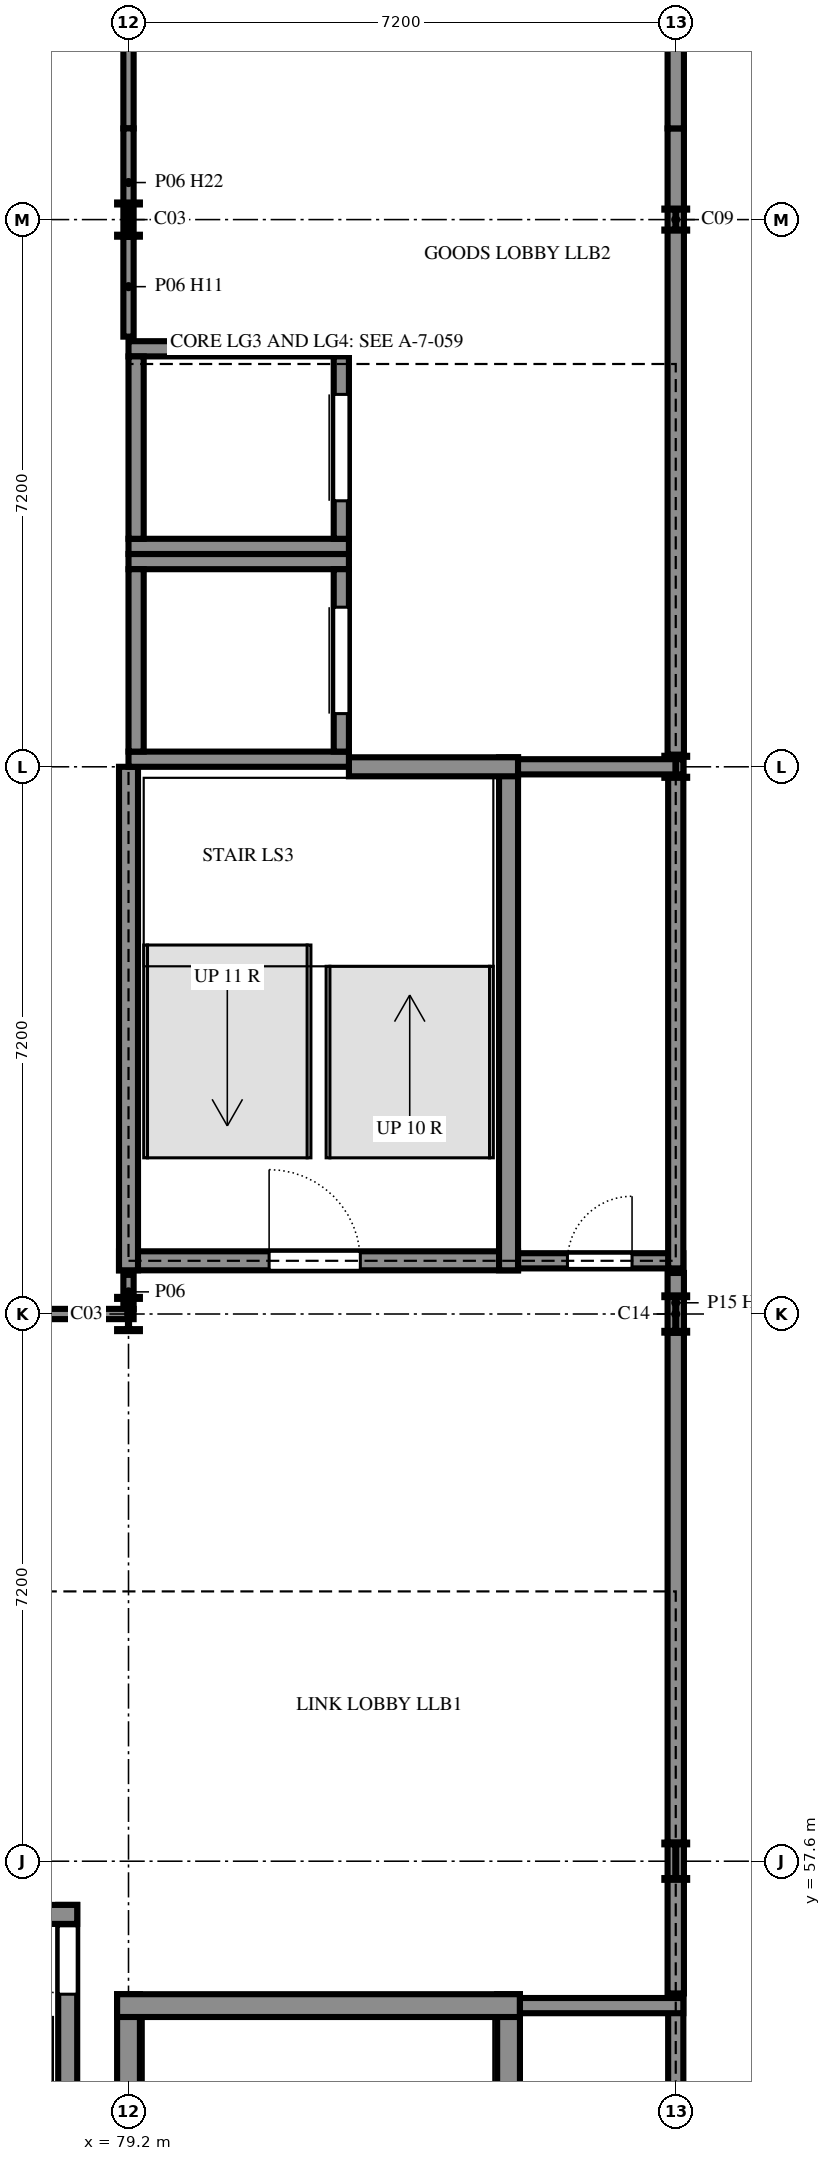
"""IFC4 building model, lengths in metres.
Left out: names, types, materials, properties, quantities, classifications, styles, units other than length and angle.
Written with IfcOpenShell. Run it as: python <this file> out.ifc"""

import sys

from ifc_helpers import new_model, si_unit, direction, frame, frame_2d, origin, origin_2d, place, context, subcontext, project, spatial, rectangle, i_section, extrude, element, fill, save


model = new_model("IFC4")
c1 = context("Model", 3, precision=1e-05, world=origin(), true_north=direction((0.0, 1.0)))
c2 = subcontext(c1, "Body", "Model", "MODEL_VIEW")
j1 = project(units=[si_unit("LENGTHUNIT", "METRE"), si_unit("PLANEANGLEUNIT", "RADIAN")], contexts=[c1])
p1 = place(None, origin())
s1 = spatial("IfcSite", under=j1, at=p1, CompositionType="ELEMENT")
p2 = place(p1, origin())
s2 = spatial("IfcBuilding", under=s1, at=p2, CompositionType="ELEMENT")
p3 = place(p2, frame((0.0, 0.0, 3.6)))
s3 = spatial("IfcBuildingStorey", under=s2, at=p3, CompositionType="ELEMENT", Elevation=3.6)
for number, where, z_axis, x_axis in (
    (1, (79.2, 64.8, 0.0), (0.0, 0.0, 1.0), (1.0, 0.0, 0.0)),
    (2, (79.2, 79.2, 0.0), (0.0, 0.0, 1.0), (1.0, 0.0, 0.0)),
):
    element("IfcColumn", number, at=place(p3, frame(where, z_axis=z_axis, x_axis=x_axis)), inside=s3, PredefinedType="COLUMN", context=c2, shape_type="SweptSolid", body=[
        extrude(i_section(OverallWidth=0.3, OverallDepth=0.45, WebThickness=0.014, FlangeThickness=0.026, FilletRadius=0.027, at=origin_2d()), origin(), (0.0, 0.0, 1.0), 3.6),
    ])
for number, where, z_axis, x_axis in (
    (3, (86.4, 57.6, 0.0), (0.0, 0.0, 1.0), (1.0, 0.0, 0.0)),
    (4, (86.4, 64.8, 0.0), (0.0, 0.0, 1.0), (1.0, 0.0, 0.0)),
):
    element("IfcColumn", number, at=place(p3, frame(where, z_axis=z_axis, x_axis=x_axis)), inside=s3, PredefinedType="COLUMN", context=c2, shape_type="SweptSolid", body=[
        extrude(i_section(OverallWidth=0.3, OverallDepth=0.49, WebThickness=0.012, FlangeThickness=0.023, FilletRadius=0.027, at=origin_2d()), origin(), (0.0, 0.0, 1.0), 3.6),
    ])
for number, where, z_axis, x_axis in (
    (5, (86.4, 72.0, 0.0), (0.0, 0.0, 1.0), (1.0, 0.0, 0.0)),
    (6, (86.4, 79.2, 0.0), (0.0, 0.0, 1.0), (1.0, 0.0, 0.0)),
):
    element("IfcColumn", number, at=place(p3, frame(where, z_axis=z_axis, x_axis=x_axis)), inside=s3, PredefinedType="COLUMN", context=c2, shape_type="SweptSolid", body=[
        extrude(i_section(OverallWidth=0.3, OverallDepth=0.29, WebThickness=0.009, FlangeThickness=0.014, FilletRadius=0.027, at=origin_2d()), origin(), (0.0, 0.0, 1.0), 3.6),
    ])
p4 = place(p3, frame((84.2, 49.05, 0.0), z_axis=(0.0, 0.0, 1.0), x_axis=(0.0, 1.0, 0.0)))
e7 = element("IfcWall", 7, at=p4, inside=s3, PredefinedType="SHEAR", context=c2, shape_type="SweptSolid", body=[
    extrude(rectangle(XDim=6.8, YDim=0.3, at=frame_2d((3.4, 0.0))), origin(), (0.0, 0.0, 1.0), 3.6),
])
p5 = place(p3, frame((86.4, 49.1, 0.0), z_axis=(0.0, 0.0, 1.0), x_axis=(0.0, 1.0, 0.0)))
e8 = element("IfcWall", 8, at=p5, inside=s3, PredefinedType="SHEAR", context=c2, shape_type="SweptSolid", body=[
    extrude(rectangle(XDim=6.7, YDim=0.2, at=frame_2d((3.35, 0.0))), origin(), (0.0, 0.0, 1.0), 3.6),
])
p6 = place(p3, frame((78.4, 50.275, 0.0), z_axis=(0.0, 0.0, 1.0), x_axis=(0.0, 1.0, 0.0)))
e9 = element("IfcWall", 9, at=p6, inside=s3, PredefinedType="SHEAR", context=c2, shape_type="SweptSolid", body=[
    extrude(rectangle(XDim=6.75, YDim=0.25, at=frame_2d((3.375, 0.0))), origin(), (0.0, 0.0, 1.0), 3.6),
])
p7 = place(p6, frame((5.575, 0.0, 0.0)))
e10 = element("IfcOpeningElement", 10, at=p7, cuts=e9, PredefinedType="OPENING", context=c2, shape_type="SweptSolid", body=[
    extrude(rectangle(XDim=0.9, YDim=2.1, at=frame_2d((0.45, 1.05))), frame((0.0, 0.135, 0.0), z_axis=(0.0, -1.0, 0.0), x_axis=(1.0, 0.0, 0.0)), (0.0, 0.0, 1.0), 0.27),
])
p8 = place(p3, frame((79.2, 55.85, 0.0), z_axis=(0.0, 0.0, 1.0), x_axis=(0.0, -1.0, 0.0)))
e11 = element("IfcWall", 11, at=p8, inside=s3, PredefinedType="SHEAR", context=c2, shape_type="SweptSolid", body=[
    extrude(rectangle(XDim=5.325, YDim=0.3, at=frame_2d((2.663, 0.0))), origin(), (0.0, 0.0, 1.0), 3.6),
])
p9 = place(p3, frame((84.35, 55.7, 0.0), z_axis=(0.0, 0.0, 1.0), x_axis=(-1.0, 0.0, 0.0)))
e12 = element("IfcWall", 12, at=p9, inside=s3, PredefinedType="SHEAR", context=c2, shape_type="SweptSolid", body=[
    extrude(rectangle(XDim=5.3, YDim=0.3, at=frame_2d((2.65, 0.0))), origin(), (0.0, 0.0, 1.0), 3.6),
])
p10 = place(p3, frame((86.5, 55.7, 0.0), z_axis=(0.0, 0.0, 1.0), x_axis=(-1.0, 0.0, 0.0)))
e13 = element("IfcWall", 13, at=p10, inside=s3, PredefinedType="SHEAR", context=c2, shape_type="SweptSolid", body=[
    extrude(rectangle(XDim=2.15, YDim=0.2, at=frame_2d((1.075, 0.0))), origin(), (0.0, 0.0, 1.0), 3.6),
])
p11 = place(p3, frame((78.525, 56.9, 0.0), z_axis=(0.0, 0.0, 1.0), x_axis=(-1.0, 0.0, 0.0)))
e14 = element("IfcWall", 14, at=p11, inside=s3, PredefinedType="SHEAR", context=c2, shape_type="SweptSolid", body=[
    extrude(rectangle(XDim=5.0, YDim=0.25, at=frame_2d((2.5, 0.0))), origin(), (0.0, 0.0, 1.0), 3.6),
])
p12 = place(p3, frame((79.075, 65.5, 0.0), z_axis=(0.0, 0.0, 1.0), x_axis=(1.0, 0.0, 0.0)))
e15 = element("IfcWall", 15, at=p12, inside=s3, PredefinedType="SHEAR", context=c2, shape_type="SweptSolid", body=[
    extrude(rectangle(XDim=5.25, YDim=0.25, at=frame_2d((2.625, 0.0))), origin(), (0.0, 0.0, 1.0), 3.6),
])
p13 = place(p12, frame((1.975, 0.0, 0.0)))
e16 = element("IfcOpeningElement", 16, at=p13, cuts=e15, PredefinedType="OPENING", context=c2, shape_type="SweptSolid", body=[
    extrude(rectangle(XDim=1.2, YDim=2.4, at=frame_2d((0.6, 1.2))), frame((0.0, 0.135, 0.0), z_axis=(0.0, -1.0, 0.0), x_axis=(1.0, 0.0, 0.0)), (0.0, 0.0, 1.0), 0.27),
])
p14 = place(p3, frame((84.325, 65.5, 0.0), z_axis=(0.0, 0.0, 1.0), x_axis=(1.0, 0.0, 0.0)))
e17 = element("IfcWall", 17, at=p14, inside=s3, PredefinedType="SHEAR", context=c2, shape_type="SweptSolid", body=[
    extrude(rectangle(XDim=2.175, YDim=0.2, at=frame_2d((1.087, 0.0))), origin(), (0.0, 0.0, 1.0), 3.6),
])
p15 = place(p14, frame((0.65, 0.0, 0.0)))
e18 = element("IfcOpeningElement", 18, at=p15, cuts=e17, PredefinedType="OPENING", context=c2, shape_type="SweptSolid", body=[
    extrude(rectangle(XDim=0.85, YDim=2.1, at=frame_2d((0.425, 1.05))), frame((0.0, 0.11, 0.0), z_axis=(0.0, -1.0, 0.0), x_axis=(1.0, 0.0, 0.0)), (0.0, 0.0, 1.0), 0.22),
])
p16 = place(p3, frame((84.2, 65.375, 0.0), z_axis=(0.0, 0.0, 1.0), x_axis=(0.0, 1.0, 0.0)))
e19 = element("IfcWall", 19, at=p16, inside=s3, PredefinedType="SHEAR", context=c2, shape_type="SweptSolid", body=[
    extrude(rectangle(XDim=6.75, YDim=0.25, at=frame_2d((3.375, 0.0))), origin(), (0.0, 0.0, 1.0), 3.6),
])
p17 = place(p3, frame((86.4, 65.4, 0.0), z_axis=(0.0, 0.0, 1.0), x_axis=(0.0, 1.0, 0.0)))
e20 = element("IfcWall", 20, at=p17, inside=s3, PredefinedType="SHEAR", context=c2, shape_type="SweptSolid", body=[
    extrude(rectangle(XDim=6.7, YDim=0.2, at=frame_2d((3.35, 0.0))), origin(), (0.0, 0.0, 1.0), 3.6),
])
p18 = place(p3, frame((79.2, 72.0, 0.0), z_axis=(0.0, 0.0, 1.0), x_axis=(0.0, -1.0, 0.0)))
e21 = element("IfcWall", 21, at=p18, inside=s3, PredefinedType="SHEAR", context=c2, shape_type="SweptSolid", body=[
    extrude(rectangle(XDim=6.625, YDim=0.25, at=frame_2d((3.312, 0.0))), origin(), (0.0, 0.0, 1.0), 3.6),
])
p19 = place(p3, frame((82.1, 72.0, 0.0), z_axis=(0.0, 0.0, 1.0), x_axis=(1.0, 0.0, 0.0)))
e22 = element("IfcWall", 22, at=p19, inside=s3, PredefinedType="SHEAR", context=c2, shape_type="SweptSolid", body=[
    extrude(rectangle(XDim=2.225, YDim=0.25, at=frame_2d((1.112, 0.0))), origin(), (0.0, 0.0, 1.0), 3.6),
])
p20 = place(p3, frame((86.5, 72.0, 0.0), z_axis=(0.0, 0.0, 1.0), x_axis=(-1.0, 0.0, 0.0)))
e23 = element("IfcWall", 23, at=p20, inside=s3, PredefinedType="SHEAR", context=c2, shape_type="SweptSolid", body=[
    extrude(rectangle(XDim=2.175, YDim=0.2, at=frame_2d((1.087, 0.0))), origin(), (0.0, 0.0, 1.0), 3.6),
])
for number, where, z_axis, x_axis in (
    (24, (79.2, 72.1, 0.0), (0.0, 0.0, 1.0), (1.0, 0.0, 0.0)),
    (25, (79.2, 74.7, 0.0), (0.0, 0.0, 1.0), (1.0, 0.0, 0.0)),
):
    element("IfcWall", number, at=place(p3, frame(where, z_axis=z_axis, x_axis=x_axis)), inside=s3, PredefinedType="SHEAR", context=c2, shape_type="SweptSolid", body=[
        extrude(rectangle(XDim=2.9, YDim=0.2, at=frame_2d((1.45, 0.0))), origin(), (0.0, 0.0, 1.0), 3.6),
    ])
p21 = place(p3, frame((79.3, 72.2, 0.0), z_axis=(0.0, 0.0, 1.0), x_axis=(0.0, 1.0, 0.0)))
e26 = element("IfcWall", 26, at=p21, inside=s3, PredefinedType="SHEAR", context=c2, shape_type="SweptSolid", body=[
    extrude(rectangle(XDim=2.4, YDim=0.2, at=frame_2d((1.2, 0.0))), origin(), (0.0, 0.0, 1.0), 3.6),
])
p22 = place(p3, frame((82.0, 72.2, 0.0), z_axis=(0.0, 0.0, 1.0), x_axis=(0.0, 1.0, 0.0)))
e27 = element("IfcWall", 27, at=p22, inside=s3, PredefinedType="SHEAR", context=c2, shape_type="SweptSolid", body=[
    extrude(rectangle(XDim=2.4, YDim=0.2, at=frame_2d((1.2, 0.0))), origin(), (0.0, 0.0, 1.0), 3.6),
])
p23 = place(p22, frame((0.5, 0.0, 0.0)))
e28 = element("IfcOpeningElement", 28, at=p23, cuts=e27, PredefinedType="OPENING", context=c2, shape_type="SweptSolid", body=[
    extrude(rectangle(XDim=1.4, YDim=2.1, at=frame_2d((0.7, 1.05))), frame((0.0, 0.11, 0.0), z_axis=(0.0, -1.0, 0.0), x_axis=(1.0, 0.0, 0.0)), (0.0, 0.0, 1.0), 0.22),
])
for number, where, z_axis, x_axis in (
    (29, (79.2, 74.9, 0.0), (0.0, 0.0, 1.0), (1.0, 0.0, 0.0)),
    (30, (79.2, 77.5, 0.0), (0.0, 0.0, 1.0), (1.0, 0.0, 0.0)),
):
    element("IfcWall", number, at=place(p3, frame(where, z_axis=z_axis, x_axis=x_axis)), inside=s3, PredefinedType="SHEAR", context=c2, shape_type="SweptSolid", body=[
        extrude(rectangle(XDim=2.9, YDim=0.2, at=frame_2d((1.45, 0.0))), origin(), (0.0, 0.0, 1.0), 3.6),
    ])
p24 = place(p3, frame((79.3, 75.0, 0.0), z_axis=(0.0, 0.0, 1.0), x_axis=(0.0, 1.0, 0.0)))
e31 = element("IfcWall", 31, at=p24, inside=s3, PredefinedType="SHEAR", context=c2, shape_type="SweptSolid", body=[
    extrude(rectangle(XDim=2.4, YDim=0.2, at=frame_2d((1.2, 0.0))), origin(), (0.0, 0.0, 1.0), 3.6),
])
p25 = place(p3, frame((82.0, 75.0, 0.0), z_axis=(0.0, 0.0, 1.0), x_axis=(0.0, 1.0, 0.0)))
e32 = element("IfcWall", 32, at=p25, inside=s3, PredefinedType="SHEAR", context=c2, shape_type="SweptSolid", body=[
    extrude(rectangle(XDim=2.4, YDim=0.2, at=frame_2d((1.2, 0.0))), origin(), (0.0, 0.0, 1.0), 3.6),
])
p26 = place(p25, frame((0.5, 0.0, 0.0)))
e33 = element("IfcOpeningElement", 33, at=p26, cuts=e32, PredefinedType="OPENING", context=c2, shape_type="SweptSolid", body=[
    extrude(rectangle(XDim=1.4, YDim=2.1, at=frame_2d((0.7, 1.05))), frame((0.0, 0.11, 0.0), z_axis=(0.0, -1.0, 0.0), x_axis=(1.0, 0.0, 0.0)), (0.0, 0.0, 1.0), 0.22),
])
p27 = place(p3, frame((79.2, 65.315, 0.0), z_axis=(0.0, 0.0, 1.0), x_axis=(0.0, -1.0, 0.0)))
e34 = element("IfcWall", 34, at=p27, inside=s3, PredefinedType="PARTITIONING", context=c2, shape_type="SweptSolid", body=[
    extrude(rectangle(XDim=0.448, YDim=0.135, at=frame_2d((0.224, 0.0))), origin(), (0.0, 0.0, 1.0), 3.42),
])
p28 = place(p3, frame((86.4, 55.86, 0.0), z_axis=(0.0, 0.0, 1.0), x_axis=(0.0, 1.0, 0.0)))
e35 = element("IfcWall", 35, at=p28, inside=s3, PredefinedType="PARTITIONING", context=c2, shape_type="SweptSolid", body=[
    extrude(rectangle(XDim=1.985, YDim=0.215, at=frame_2d((0.992, 0.0))), origin(), (0.0, 0.0, 1.0), 3.6),
])
p29 = place(p3, frame((79.2, 77.66, 0.0), z_axis=(0.0, 0.0, 1.0), x_axis=(0.0, 1.0, 0.0)))
e36 = element("IfcWall", 36, at=p29, inside=s3, PredefinedType="PARTITIONING", context=c2, shape_type="SweptSolid", body=[
    extrude(rectangle(XDim=1.315, YDim=0.135, at=frame_2d((0.658, 0.0))), origin(), (0.0, 0.0, 1.0), 3.22),
])
p30 = place(p3, frame((86.4, 80.4, 0.0), z_axis=(0.0, 0.0, 1.0), x_axis=(0.0, -1.0, 0.0)))
e37 = element("IfcWall", 37, at=p30, inside=s3, PredefinedType="PARTITIONING", context=c2, shape_type="SweptSolid", body=[
    extrude(rectangle(XDim=8.24, YDim=0.215, at=frame_2d((4.12, 0.0))), origin(), (0.0, 0.0, 1.0), 3.12),
])
p31 = place(p3, frame((79.2, 86.333, 0.0), z_axis=(0.0, 0.0, 1.0), x_axis=(0.0, -1.0, 0.0)))
e38 = element("IfcWall", 38, at=p31, inside=s3, PredefinedType="PARTITIONING", context=c2, shape_type="SweptSolid", body=[
    extrude(rectangle(XDim=5.933, YDim=0.135, at=frame_2d((2.966, 0.0))), origin(), (0.0, 0.0, 1.0), 2.87),
])
p32 = place(p3, frame((86.4, 80.4, 0.0), z_axis=(0.0, 0.0, 1.0), x_axis=(0.0, 1.0, 0.0)))
e39 = element("IfcWall", 39, at=p32, inside=s3, PredefinedType="PARTITIONING", context=c2, shape_type="SweptSolid", body=[
    extrude(rectangle(XDim=11.34, YDim=0.215, at=frame_2d((5.67, 0.0))), origin(), (0.0, 0.0, 1.0), 3.12),
])
p33 = place(p3, frame((79.268, 64.8, 0.0), z_axis=(0.0, 0.0, 1.0), x_axis=(-1.0, 0.0, 0.0)))
e40 = element("IfcWall", 40, at=p33, inside=s3, PredefinedType="PARTITIONING", context=c2, shape_type="SweptSolid", body=[
    extrude(rectangle(XDim=7.935, YDim=0.135, at=frame_2d((3.968, 0.0))), origin(), (0.0, 0.0, 1.0), 2.82),
])
p34 = place(p3, frame((86.4, 57.845, 0.0), z_axis=(0.0, 0.0, 1.0), x_axis=(0.0, 1.0, 0.0)))
e41 = element("IfcWall", 41, at=p34, inside=s3, PredefinedType="PARTITIONING", context=c2, shape_type="SweptSolid", body=[
    extrude(rectangle(XDim=6.71, YDim=0.215, at=frame_2d((3.355, 0.0))), origin(), (0.0, 0.0, 1.0), 3.12),
])
p35 = place(p3, frame((86.4, 64.555, 0.0), z_axis=(0.0, 0.0, 1.0), x_axis=(0.0, 1.0, 0.0)))
e42 = element("IfcWall", 42, at=p35, inside=s3, PredefinedType="PARTITIONING", context=c2, shape_type="SweptSolid", body=[
    extrude(rectangle(XDim=0.785, YDim=0.215, at=frame_2d((0.393, 0.0))), origin(), (0.0, 0.0, 1.0), 3.6),
])
p36 = place(p3, frame((79.2, 78.975, 0.0), z_axis=(0.0, 0.0, 1.0), x_axis=(0.0, 1.0, 0.0)))
e43 = element("IfcWall", 43, at=p36, inside=s3, PredefinedType="PARTITIONING", context=c2, shape_type="SweptSolid", body=[
    extrude(rectangle(XDim=1.425, YDim=0.135, at=frame_2d((0.712, 0.0))), origin(), (0.0, 0.0, 1.0), 2.87),
])
p37 = place(p23, origin())
e44 = element("IfcDoor", 44, at=p37, inside=s3, OperationType="SLIDING_TO_LEFT", PredefinedType="DOOR", context=c2, shape_type="SweptSolid", body=[
    extrude(rectangle(XDim=1.4, YDim=2.1, at=frame_2d((0.7, 1.05))), frame((0.0, 0.025, 0.0), z_axis=(0.0, -1.0, 0.0), x_axis=(1.0, 0.0, 0.0)), (0.0, 0.0, 1.0), 0.05),
])
fill(e28, e44)
p38 = place(p26, origin())
e45 = element("IfcDoor", 45, at=p38, inside=s3, OperationType="SLIDING_TO_LEFT", PredefinedType="DOOR", context=c2, shape_type="SweptSolid", body=[
    extrude(rectangle(XDim=1.4, YDim=2.1, at=frame_2d((0.7, 1.05))), frame((0.0, 0.025, 0.0), z_axis=(0.0, -1.0, 0.0), x_axis=(1.0, 0.0, 0.0)), (0.0, 0.0, 1.0), 0.05),
])
fill(e33, e45)
p39 = place(p7, origin())
e46 = element("IfcDoor", 46, at=p39, inside=s3, OperationType="SINGLE_SWING_LEFT", PredefinedType="DOOR", context=c2, shape_type="SweptSolid", body=[
    extrude(rectangle(XDim=0.9, YDim=2.1, at=frame_2d((0.45, 1.05))), frame((0.0, 0.025, 0.0), z_axis=(0.0, -1.0, 0.0), x_axis=(1.0, 0.0, 0.0)), (0.0, 0.0, 1.0), 0.05),
])
fill(e10, e46)
p40 = place(p13, origin())
e47 = element("IfcDoor", 47, at=p40, inside=s3, OperationType="SINGLE_SWING_RIGHT", PredefinedType="DOOR", context=c2, shape_type="SweptSolid", body=[
    extrude(rectangle(XDim=1.2, YDim=2.4, at=frame_2d((0.6, 1.2))), frame((0.0, 0.025, 0.0), z_axis=(0.0, -1.0, 0.0), x_axis=(1.0, 0.0, 0.0)), (0.0, 0.0, 1.0), 0.05),
])
fill(e16, e47)
p41 = place(p15, origin())
e48 = element("IfcDoor", 48, at=p41, inside=s3, OperationType="SINGLE_SWING_LEFT", PredefinedType="DOOR", context=c2, shape_type="SweptSolid", body=[
    extrude(rectangle(XDim=0.85, YDim=2.1, at=frame_2d((0.425, 1.05))), frame((0.0, 0.025, 0.0), z_axis=(0.0, -1.0, 0.0), x_axis=(1.0, 0.0, 0.0)), (0.0, 0.0, 1.0), 0.05),
])
fill(e18, e48)
save(model, sys.argv[1])
